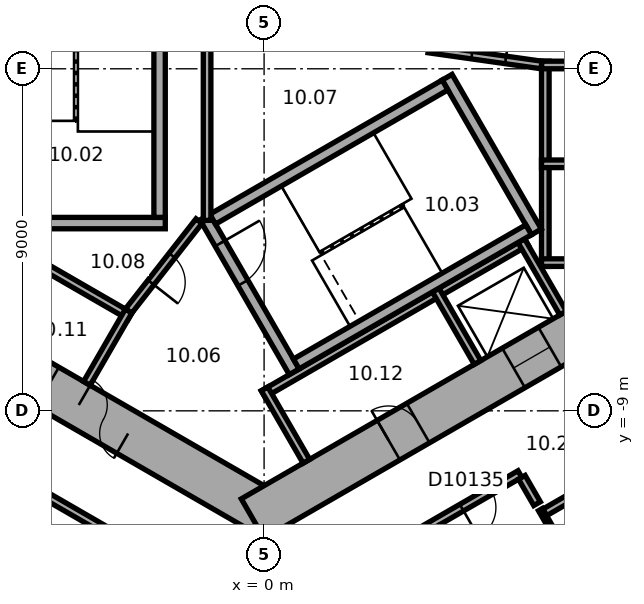
"""IFC4 building model, lengths in metres.
Left out: names, types, materials, properties, quantities, classifications, styles, units other than length and angle.
Written with IfcOpenShell. Run it as: python <this file> out.ifc"""

import sys

from ifc_helpers import new_model, si_unit, direction, frame, frame_2d, origin, place, context, subcontext, project, spatial, rectangle, extrude, element, fill, save


model = new_model("IFC4")
c1 = context("Model", 3, precision=1e-05, world=origin(), true_north=direction((0.0, 1.0)))
c2 = subcontext(c1, "Body", "Model", "MODEL_VIEW")
j1 = project(units=[si_unit("LENGTHUNIT", "METRE"), si_unit("PLANEANGLEUNIT", "RADIAN")], contexts=[c1])
p1 = place(None, origin())
s1 = spatial("IfcSite", under=j1, at=p1, CompositionType="ELEMENT")
p2 = place(p1, origin())
s2 = spatial("IfcBuilding", under=s1, at=p2, CompositionType="ELEMENT")
p3 = place(p2, frame((0.0, 0.0, 53.9)))
s3 = spatial("IfcBuildingStorey", under=s2, at=p3, CompositionType="ELEMENT", Elevation=53.9)
p4 = place(p3, frame((-10.4, -5.658, 0.0), z_axis=(0.0, 0.0, 1.0), x_axis=(0.866021384402, -0.500006961711, 0.0)))
e1 = element("IfcWall", 1, at=p4, inside=s3, PredefinedType="SHEAR", context=c2, shape_type="SweptSolid", body=[
    extrude(rectangle(XDim=12.355, YDim=1.2, at=frame_2d((6.178, 0.0))), origin(), (0.0, 0.0, 1.0), 3.3),
])
p5 = place(p4, frame((6.378, 0.0, 0.0)))
e2 = element("IfcOpeningElement", 2, at=p5, cuts=e1, PredefinedType="OPENING", context=c2, shape_type="SweptSolid", body=[
    extrude(rectangle(XDim=1.5, YDim=2.1, at=frame_2d((0.75, 1.05))), frame((0.0, 0.61, 0.0), z_axis=(0.0, -1.0, 0.0), x_axis=(1.0, 0.0, 0.0)), (0.0, 0.0, 1.0), 1.22),
])
p6 = place(p4, frame((1.928, 0.0, 0.0)))
e3 = element("IfcOpeningElement", 3, at=p6, cuts=e1, PredefinedType="OPENING", context=c2, shape_type="SweptSolid", body=[
    extrude(rectangle(XDim=0.9, YDim=2.1, at=frame_2d((0.45, 1.05))), frame((0.0, 0.61, 0.0), z_axis=(0.0, -1.0, 0.0), x_axis=(1.0, 0.0, 0.0)), (0.0, 0.0, 1.0), 1.22),
])
p7 = place(p4, frame((4.528, 0.0, 0.0)))
e4 = element("IfcOpeningElement", 4, at=p7, cuts=e1, PredefinedType="OPENING", context=c2, shape_type="SweptSolid", body=[
    extrude(rectangle(XDim=0.9, YDim=2.1, at=frame_2d((0.45, 1.05))), frame((0.0, 0.61, 0.0), z_axis=(0.0, -1.0, 0.0), x_axis=(1.0, 0.0, 0.0)), (0.0, 0.0, 1.0), 1.22),
])
p8 = place(p3, frame((-0.3, -11.836, 0.0), z_axis=(0.0, 0.0, 1.0), x_axis=(0.866021384402, 0.500006961711, 0.0)))
e5 = element("IfcWall", 5, at=p8, inside=s3, PredefinedType="SHEAR", context=c2, shape_type="SweptSolid", body=[
    extrude(rectangle(XDim=12.355, YDim=1.2, at=frame_2d((6.178, 0.0))), origin(), (0.0, 0.0, 1.0), 3.3),
])
p9 = place(p8, frame((4.128, 0.0, 0.0)))
e6 = element("IfcOpeningElement", 6, at=p9, cuts=e5, PredefinedType="OPENING", context=c2, shape_type="SweptSolid", body=[
    extrude(rectangle(XDim=0.9, YDim=2.1, at=frame_2d((0.45, 1.05))), frame((0.0, 0.61, 0.0), z_axis=(0.0, -1.0, 0.0), x_axis=(1.0, 0.0, 0.0)), (0.0, 0.0, 1.0), 1.22),
])
p10 = place(p8, frame((7.928, 0.0, 0.0)))
e7 = element("IfcOpeningElement", 7, at=p10, cuts=e5, PredefinedType="OPENING", context=c2, shape_type="SweptSolid", body=[
    extrude(rectangle(XDim=1.1, YDim=2.1, at=frame_2d((0.55, 1.05))), frame((0.0, 0.61, 0.0), z_axis=(0.0, -1.0, 0.0), x_axis=(1.0, 0.0, 0.0)), (0.0, 0.0, 1.0), 1.22),
])
p11 = place(p3, frame((7.4, -5.2, 0.0), z_axis=(0.0, 0.0, 1.0), x_axis=(0.0, 1.0, 0.0)))
e8 = element("IfcWall", 8, at=p11, inside=s3, PredefinedType="PARTITIONING", context=c2, shape_type="SweptSolid", body=[
    extrude(rectangle(XDim=5.4, YDim=0.2, at=frame_2d((2.7, 0.0))), origin(), (0.0, 0.0, 1.0), 3.05),
])
for number, where, z_axis, x_axis in (
    (9, (7.3, -5.1, 0.0), (0.0, 0.0, 1.0), (1.0, 0.0, 0.0)),
    (10, (7.3, -2.5, 0.0), (0.0, 0.0, 1.0), (1.0, 0.0, 0.0)),
    (11, (7.3, 0.1, 0.0), (0.0, 0.0, 1.0), (1.0, 0.0, 0.0)),
):
    element("IfcWall", number, at=place(p3, frame(where, z_axis=z_axis, x_axis=x_axis)), inside=s3, PredefinedType="PARTITIONING", context=c2, shape_type="SweptSolid", body=[
        extrude(rectangle(XDim=2.2, YDim=0.2, at=frame_2d((1.1, 0.0))), origin(), (0.0, 0.0, 1.0), 3.05),
    ])
p12 = place(p3, frame((-8.203, -3.809, 0.0), z_axis=(0.0, 0.0, 1.0), x_axis=(0.866028230842, -0.499995103361, 0.0)))
e12 = element("IfcWall", 12, at=p12, inside=s3, PredefinedType="PARTITIONING", context=c2, shape_type="SweptSolid", body=[
    extrude(rectangle(XDim=5.4, YDim=0.2, at=frame_2d((2.7, 0.0))), origin(), (0.0, 0.0, 1.0), 3.05),
])
p13 = place(p3, frame((-3.563, -6.372, 0.0), z_axis=(0.0, 0.0, 1.0), x_axis=(-0.499994660107, -0.866028486751, 0.0)))
e13 = element("IfcWall", 13, at=p13, inside=s3, PredefinedType="PARTITIONING", context=c2, shape_type="SweptSolid", body=[
    extrude(rectangle(XDim=2.2, YDim=0.2, at=frame_2d((1.1, 0.0))), origin(), (0.0, 0.0, 1.0), 3.05),
])
p14 = place(p3, frame((-0.024, -8.559, 0.0), z_axis=(0.0, 0.0, 1.0), x_axis=(0.866026010844, 0.49999894854, 0.0)))
e14 = element("IfcWall", 14, at=p14, inside=s3, PredefinedType="PARTITIONING", context=c2, shape_type="SweptSolid", body=[
    extrude(rectangle(XDim=8.0, YDim=0.2, at=frame_2d((4.0, 0.0))), origin(), (0.0, 0.0, 1.0), 3.05),
])
for number, where, z_axis, x_axis in (
    (15, (0.013, -8.422, 0.0), (0.0, 0.0, 1.0), (0.5, -0.866, 0.0)),
    (16, (4.516, -5.822, 0.0), (0.0, 0.0, 1.0), (0.5, -0.866, 0.0)),
    (17, (6.768, -4.522, 0.0), (0.0, 0.0, 1.0), (0.5, -0.866, 0.0)),
):
    element("IfcWall", number, at=place(p3, frame(where, z_axis=z_axis, x_axis=x_axis)), inside=s3, PredefinedType="PARTITIONING", context=c2, shape_type="SweptSolid", body=[
        extrude(rectangle(XDim=2.2, YDim=0.2, at=frame_2d((1.1, 0.0))), origin(), (0.0, 0.0, 1.0), 3.05),
    ])
p15 = place(p3, frame((-2.6, -4.06, 0.0), z_axis=(0.0, 0.0, 1.0), x_axis=(-1.0, 0.0, 0.0)))
e18 = element("IfcWall", 18, at=p15, inside=s3, PredefinedType="SHEAR", context=c2, shape_type="SweptSolid", body=[
    extrude(rectangle(XDim=4.7, YDim=0.3, at=frame_2d((2.35, 0.0))), origin(), (0.0, 0.0, 1.0), 3.05),
])
p16 = place(p3, frame((-2.75, 3.15, 0.0), z_axis=(0.0, 0.0, 1.0), x_axis=(0.0, -1.0, 0.0)))
e19 = element("IfcWall", 19, at=p16, inside=s3, PredefinedType="SHEAR", context=c2, shape_type="SweptSolid", body=[
    extrude(rectangle(XDim=7.06, YDim=0.3, at=frame_2d((3.53, 0.0))), origin(), (0.0, 0.0, 1.0), 3.05),
])
p17 = place(p3, frame((-1.558, -3.902, 0.0), z_axis=(0.0, 0.0, 1.0), x_axis=(0.499977259774, -0.866038532462, 0.0)))
e20 = element("IfcWall", 20, at=p17, inside=s3, PredefinedType="SHEAR", context=c2, shape_type="SweptSolid", body=[
    extrude(rectangle(XDim=4.7, YDim=0.3, at=frame_2d((2.35, 0.0))), origin(), (0.0, 0.0, 1.0), 3.05),
])
p18 = place(p17, frame((0.8, 0.0, 0.0)))
e21 = element("IfcOpeningElement", 21, at=p18, cuts=e20, PredefinedType="OPENING", context=c2, shape_type="SweptSolid", body=[
    extrude(rectangle(XDim=1.2, YDim=2.1, at=frame_2d((0.6, 1.05))), frame((0.0, 0.16, 0.0), z_axis=(0.0, -1.0, 0.0), x_axis=(1.0, 0.0, 0.0)), (0.0, 0.0, 1.0), 0.32),
])
p19 = place(p3, frame((4.816, -0.222, 0.0), z_axis=(0.0, 0.0, 1.0), x_axis=(0.499977259774, -0.866038532462, 0.0)))
e22 = element("IfcWall", 22, at=p19, inside=s3, PredefinedType="SHEAR", context=c2, shape_type="SweptSolid", body=[
    extrude(rectangle(XDim=4.7, YDim=0.3, at=frame_2d((2.35, 0.0))), origin(), (0.0, 0.0, 1.0), 3.05),
])
for number, where, z_axis, x_axis in (
    (23, (-1.353, -3.957, 0.0), (0.0, 0.0, 1.0), (0.866, 0.5, 0.0)),
    (24, (0.847, -7.767, 0.0), (0.0, 0.0, 1.0), (0.866, 0.5, 0.0)),
):
    element("IfcWall", number, at=place(p3, frame(where, z_axis=z_axis, x_axis=x_axis)), inside=s3, PredefinedType="SHEAR", context=c2, shape_type="SweptSolid", body=[
        extrude(rectangle(XDim=7.06, YDim=0.3, at=frame_2d((3.53, 0.0))), origin(), (0.0, 0.0, 1.0), 3.05),
    ])
p20 = place(p3, frame((4.327, 0.521, 0.0), z_axis=(0.0, 0.0, 1.0), x_axis=(0.990124376366, -0.14019172346, 0.0)))
e25 = element("IfcWall", 25, at=p20, inside=s3, PredefinedType="PARTITIONING", context=c2, shape_type="SweptSolid", body=[
    extrude(rectangle(XDim=3.002, YDim=0.2, at=frame_2d((1.501, 0.0))), origin(), (0.0, 0.0, 1.0), 3.05),
])
p21 = place(p20, frame((1.15, 0.0, 0.0)))
e26 = element("IfcOpeningElement", 26, at=p21, cuts=e25, PredefinedType="OPENING", context=c2, shape_type="SweptSolid", body=[
    extrude(rectangle(XDim=0.9, YDim=2.1, at=frame_2d((0.45, 1.05))), frame((0.0, 0.11, 0.0), z_axis=(0.0, -1.0, 0.0), x_axis=(1.0, 0.0, 0.0)), (0.0, 0.0, 1.0), 0.22),
])
p22 = place(p3, frame((-1.712, -4.008, 0.0), z_axis=(0.0, 0.0, 1.0), x_axis=(-0.616549420702, -0.787316208287, 0.0)))
e27 = element("IfcWall", 27, at=p22, inside=s3, PredefinedType="PARTITIONING", context=c2, shape_type="SweptSolid", body=[
    extrude(rectangle(XDim=3.002, YDim=0.2, at=frame_2d((1.501, 0.0))), origin(), (0.0, 0.0, 1.0), 3.05),
])
p23 = place(p22, frame((1.15, 0.0, 0.0)))
e28 = element("IfcOpeningElement", 28, at=p23, cuts=e27, PredefinedType="OPENING", context=c2, shape_type="SweptSolid", body=[
    extrude(rectangle(XDim=0.9, YDim=2.1, at=frame_2d((0.45, 1.05))), frame((0.0, 0.11, 0.0), z_axis=(0.0, -1.0, 0.0), x_axis=(1.0, 0.0, 0.0)), (0.0, 0.0, 1.0), 0.22),
])
p24 = place(p3, frame((-1.5, -3.988, 0.0), z_axis=(0.0, 0.0, 1.0), x_axis=(0.0, 1.0, 0.0)))
e29 = element("IfcWall", 29, at=p24, inside=s3, PredefinedType="PARTITIONING", context=c2, shape_type="SweptSolid", body=[
    extrude(rectangle(XDim=7.977, YDim=0.2, at=frame_2d((3.988, 0.0))), origin(), (0.0, 0.0, 1.0), 3.05),
])
p25 = place(p3, frame((-11.615, -7.843, 0.0), z_axis=(0.0, 0.0, 1.0), x_axis=(0.866026466995, -0.499998158461, 0.0)))
e30 = element("IfcWall", 30, at=p25, inside=s3, PredefinedType="PARTITIONING", context=c2, shape_type="SweptSolid", body=[
    extrude(rectangle(XDim=12.315, YDim=0.2, at=frame_2d((6.158, 0.0))), origin(), (0.0, 0.0, 1.0), 3.05),
])
p26 = place(p25, frame((4.608, 0.0, 0.0)))
e31 = element("IfcOpeningElement", 31, at=p26, cuts=e30, PredefinedType="OPENING", context=c2, shape_type="SweptSolid", body=[
    extrude(rectangle(XDim=1.0, YDim=2.1, at=frame_2d((0.5, 1.05))), frame((0.0, 0.11, 0.0), z_axis=(0.0, -1.0, 0.0), x_axis=(1.0, 0.0, 0.0)), (0.0, 0.0, 1.0), 0.22),
])
p27 = place(p25, frame((9.317, 0.0, 0.0)))
e32 = element("IfcOpeningElement", 32, at=p27, cuts=e30, PredefinedType="OPENING", context=c2, shape_type="SweptSolid", body=[
    extrude(rectangle(XDim=0.9, YDim=2.1, at=frame_2d((0.45, 1.05))), frame((0.0, 0.11, 0.0), z_axis=(0.0, -1.0, 0.0), x_axis=(1.0, 0.0, 0.0)), (0.0, 0.0, 1.0), 0.22),
])
p28 = place(p3, frame((-11.463, -10.125, 0.0), z_axis=(0.0, 0.0, 1.0), x_axis=(0.866014882148, -0.500018223566, 0.0)))
e33 = element("IfcWall", 33, at=p28, inside=s3, PredefinedType="PARTITIONING", context=c2, shape_type="SweptSolid", body=[
    extrude(rectangle(XDim=7.669, YDim=0.12, at=frame_2d((3.834, 0.0))), origin(), (0.0, 0.0, 1.0), 3.05),
])
p29 = place(p28, frame((0.55, 0.0, 0.0)))
e34 = element("IfcOpeningElement", 34, at=p29, cuts=e33, PredefinedType="OPENING", context=c2, shape_type="SweptSolid", body=[
    extrude(rectangle(XDim=1.0, YDim=2.1, at=frame_2d((0.5, 1.05))), frame((0.0, 0.07, 0.0), z_axis=(0.0, -1.0, 0.0), x_axis=(1.0, 0.0, 0.0)), (0.0, 0.0, 1.0), 0.14),
])
p30 = place(p28, frame((2.7, 0.0, 0.0)))
e35 = element("IfcOpeningElement", 35, at=p30, cuts=e33, PredefinedType="OPENING", context=c2, shape_type="SweptSolid", body=[
    extrude(rectangle(XDim=0.9, YDim=2.1, at=frame_2d((0.45, 1.05))), frame((0.0, 0.07, 0.0), z_axis=(0.0, -1.0, 0.0), x_axis=(1.0, 0.0, 0.0)), (0.0, 0.0, 1.0), 0.14),
])
p31 = place(p28, frame((5.485, 0.0, 0.0)))
e36 = element("IfcOpeningElement", 36, at=p31, cuts=e33, PredefinedType="OPENING", context=c2, shape_type="SweptSolid", body=[
    extrude(rectangle(XDim=0.9, YDim=2.1, at=frame_2d((0.45, 1.05))), frame((0.0, 0.07, 0.0), z_axis=(0.0, -1.0, 0.0), x_axis=(1.0, 0.0, 0.0)), (0.0, 0.0, 1.0), 0.14),
])
p32 = place(p3, frame((1.033, -13.953, 0.0), z_axis=(0.0, 0.0, 1.0), x_axis=(0.866017531406, 0.500013635111, 0.0)))
e37 = element("IfcWall", 37, at=p32, inside=s3, PredefinedType="PARTITIONING", context=c2, shape_type="SweptSolid", body=[
    extrude(rectangle(XDim=6.58, YDim=0.2, at=frame_2d((3.29, 0.0))), origin(), (0.0, 0.0, 1.0), 3.05),
])
p33 = place(p32, frame((1.521, 0.0, 0.0)))
e38 = element("IfcOpeningElement", 38, at=p33, cuts=e37, PredefinedType="OPENING", context=c2, shape_type="SweptSolid", body=[
    extrude(rectangle(XDim=0.9, YDim=2.1, at=frame_2d((0.45, 1.05))), frame((0.0, 0.11, 0.0), z_axis=(0.0, -1.0, 0.0), x_axis=(1.0, 0.0, 0.0)), (0.0, 0.0, 1.0), 0.22),
])
p34 = place(p32, frame((4.811, 0.0, 0.0)))
e39 = element("IfcOpeningElement", 39, at=p34, cuts=e37, PredefinedType="OPENING", context=c2, shape_type="SweptSolid", body=[
    extrude(rectangle(XDim=0.9, YDim=2.1, at=frame_2d((0.45, 1.05))), frame((0.0, 0.11, 0.0), z_axis=(0.0, -1.0, 0.0), x_axis=(1.0, 0.0, 0.0)), (0.0, 0.0, 1.0), 0.22),
])
p35 = place(p3, frame((6.782, -10.749, 0.0), z_axis=(0.0, 0.0, 1.0), x_axis=(0.500170954823, -0.865926680471, 0.0)))
e40 = element("IfcWall", 40, at=p35, inside=s3, PredefinedType="PARTITIONING", context=c2, shape_type="SweptSolid", body=[
    extrude(rectangle(XDim=0.801, YDim=0.2, at=frame_2d((0.4, 0.0))), origin(), (0.0, 0.0, 1.0), 3.05),
])
p36 = place(p3, frame((7.385, -11.673, 0.0), z_axis=(0.0, 0.0, 1.0), x_axis=(0.866037524642, 0.499979005472, 0.0)))
e41 = element("IfcWall", 41, at=p36, inside=s3, PredefinedType="PARTITIONING", context=c2, shape_type="SweptSolid", body=[
    extrude(rectangle(XDim=3.542, YDim=0.2, at=frame_2d((1.771, 0.0))), origin(), (0.0, 0.0, 1.0), 3.05),
])
p37 = place(p3, frame((8.733, -14.127, 0.0), z_axis=(0.0, 0.0, 1.0), x_axis=(-0.499978132246, 0.86603802877, 0.0)))
e42 = element("IfcWall", 42, at=p37, inside=s3, PredefinedType="PARTITIONING", context=c2, shape_type="SweptSolid", body=[
    extrude(rectangle(XDim=2.921, YDim=0.12, at=frame_2d((1.46, 0.0))), origin(), (0.0, 0.0, 1.0), 3.05),
])
p38 = place(p37, frame((1.01, 0.0, 0.0)))
e43 = element("IfcOpeningElement", 43, at=p38, cuts=e42, PredefinedType="OPENING", context=c2, shape_type="SweptSolid", body=[
    extrude(rectangle(XDim=0.9, YDim=2.1, at=frame_2d((0.45, 1.05))), frame((0.0, 0.07, 0.0), z_axis=(0.0, -1.0, 0.0), x_axis=(1.0, 0.0, 0.0)), (0.0, 0.0, 1.0), 0.14),
])
p39 = place(p5, origin())
e44 = element("IfcDoor", 44, at=p39, inside=s3, OperationType="DOUBLE_DOOR_SINGLE_SWING", PredefinedType="DOOR", context=c2, shape_type="SweptSolid", body=[
    extrude(rectangle(XDim=1.5, YDim=2.1, at=frame_2d((0.75, 1.05))), frame((0.0, 0.025, 0.0), z_axis=(0.0, -1.0, 0.0), x_axis=(1.0, 0.0, 0.0)), (0.0, 0.0, 1.0), 0.05),
])
fill(e2, e44)
p40 = place(p18, origin())
e45 = element("IfcDoor", 45, at=p40, inside=s3, OperationType="SINGLE_SWING_RIGHT", PredefinedType="DOOR", context=c2, shape_type="SweptSolid", body=[
    extrude(rectangle(XDim=1.2, YDim=2.1, at=frame_2d((0.6, 1.05))), frame((0.0, 0.025, 0.0), z_axis=(0.0, -1.0, 0.0), x_axis=(1.0, 0.0, 0.0)), (0.0, 0.0, 1.0), 0.05),
])
fill(e21, e45)
p41 = place(p21, origin())
e46 = element("IfcDoor", 46, at=p41, inside=s3, OperationType="SINGLE_SWING_LEFT", PredefinedType="DOOR", context=c2, shape_type="SweptSolid", body=[
    extrude(rectangle(XDim=0.9, YDim=2.1, at=frame_2d((0.45, 1.05))), frame((0.0, 0.025, 0.0), z_axis=(0.0, -1.0, 0.0), x_axis=(1.0, 0.0, 0.0)), (0.0, 0.0, 1.0), 0.05),
])
fill(e26, e46)
p42 = place(p23, origin())
e47 = element("IfcDoor", 47, at=p42, inside=s3, OperationType="SINGLE_SWING_LEFT", PredefinedType="DOOR", context=c2, shape_type="SweptSolid", body=[
    extrude(rectangle(XDim=0.9, YDim=2.1, at=frame_2d((0.45, 1.05))), frame((0.0, 0.025, 0.0), z_axis=(0.0, -1.0, 0.0), x_axis=(1.0, 0.0, 0.0)), (0.0, 0.0, 1.0), 0.05),
])
fill(e28, e47)
p43 = place(p9, origin())
e48 = element("IfcDoor", 48, at=p43, inside=s3, OperationType="SINGLE_SWING_LEFT", PredefinedType="DOOR", context=c2, shape_type="SweptSolid", body=[
    extrude(rectangle(XDim=0.9, YDim=2.1, at=frame_2d((0.45, 1.05))), frame((0.0, 0.025, 0.0), z_axis=(0.0, -1.0, 0.0), x_axis=(1.0, 0.0, 0.0)), (0.0, 0.0, 1.0), 0.05),
])
fill(e6, e48)
p44 = place(p10, origin())
e49 = element("IfcDoor", 49, at=p44, inside=s3, OperationType="DOUBLE_DOOR_SLIDING", PredefinedType="DOOR", context=c2, shape_type="SweptSolid", body=[
    extrude(rectangle(XDim=1.1, YDim=2.1, at=frame_2d((0.55, 1.05))), frame((0.0, 0.025, 0.0), z_axis=(0.0, -1.0, 0.0), x_axis=(1.0, 0.0, 0.0)), (0.0, 0.0, 1.0), 0.05),
])
fill(e7, e49)
p45 = place(p34, origin())
e50 = element("IfcDoor", 50, at=p45, inside=s3, OperationType="SINGLE_SWING_LEFT", PredefinedType="DOOR", context=c2, shape_type="SweptSolid", body=[
    extrude(rectangle(XDim=0.9, YDim=2.1, at=frame_2d((0.45, 1.05))), frame((0.0, 0.025, 0.0), z_axis=(0.0, -1.0, 0.0), x_axis=(1.0, 0.0, 0.0)), (0.0, 0.0, 1.0), 0.05),
])
fill(e39, e50)
save(model, sys.argv[1])
